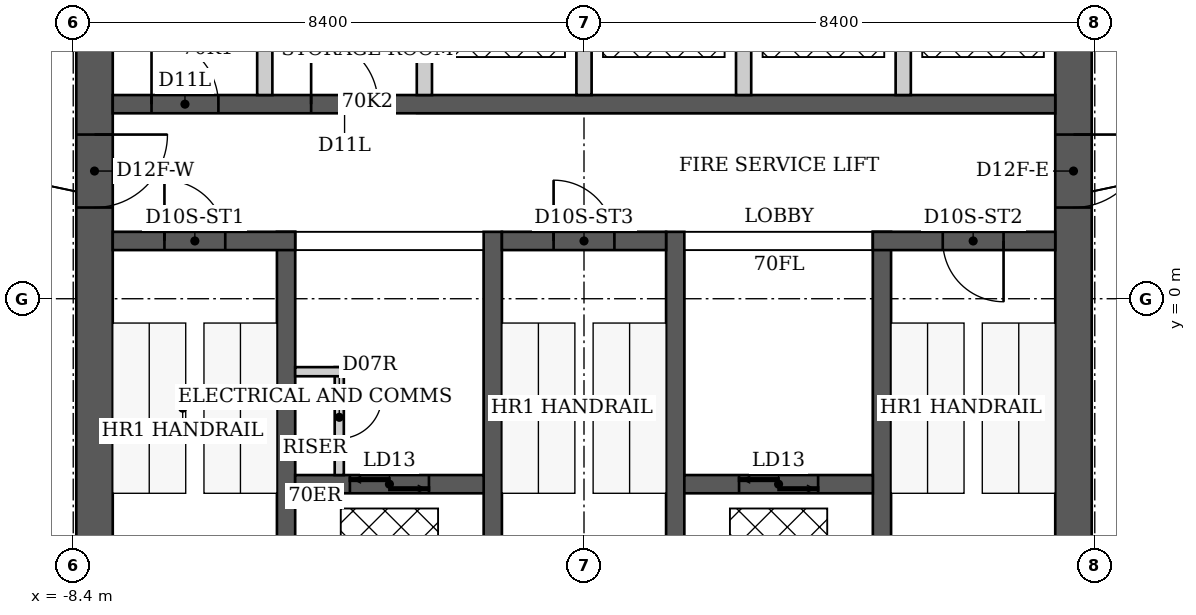
"""IFC4 building model, lengths in metres.
Left out: names, types, materials, properties, quantities, classifications, styles, units other than length and angle.
Written with IfcOpenShell. Run it as: python <this file> out.ifc"""

import sys

from ifc_helpers import new_model, si_unit, direction, frame, frame_2d, origin, place, context, subcontext, project, spatial, rectangle, extrude, element, fill, save


model = new_model("IFC4")
c1 = context("Model", 3, precision=1e-05, world=origin(), true_north=direction((0.0, 1.0)))
c2 = subcontext(c1, "Body", "Model", "MODEL_VIEW")
j1 = project(units=[si_unit("LENGTHUNIT", "METRE"), si_unit("PLANEANGLEUNIT", "RADIAN")], contexts=[c1])
p1 = place(None, origin())
s1 = spatial("IfcSite", under=j1, at=p1, CompositionType="ELEMENT")
p2 = place(p1, origin())
s2 = spatial("IfcBuilding", under=s1, at=p2, CompositionType="ELEMENT")
p3 = place(p2, frame((0.0, 0.0, 279.8)))
s3 = spatial("IfcBuildingStorey", under=s2, at=p3, CompositionType="ELEMENT", Elevation=279.8)
p4 = place(p3, frame((-8.05, -6.1, 0.0), z_axis=(0.0, 0.0, 1.0), x_axis=(0.0, 1.0, 0.0)))
e1 = element("IfcWall", 1, at=p4, inside=s3, PredefinedType="SHEAR", context=c2, shape_type="SweptSolid", body=[
    extrude(rectangle(XDim=12.2, YDim=0.6, at=frame_2d((6.1, 0.0))), origin(), (0.0, 0.0, 1.0), 3.8),
])
p5 = place(p4, frame((7.6, 0.0, 0.0)))
e2 = element("IfcOpeningElement", 2, at=p5, cuts=e1, PredefinedType="OPENING", context=c2, shape_type="SweptSolid", body=[
    extrude(rectangle(XDim=1.2, YDim=2.2, at=frame_2d((0.6, 1.1))), frame((0.0, 0.3, 0.0), z_axis=(0.0, -1.0, 0.0), x_axis=(1.0, 0.0, 0.0)), (0.0, 0.0, 1.0), 0.6),
])
p6 = place(p3, frame((8.05, -6.1, 0.0), z_axis=(0.0, 0.0, 1.0), x_axis=(0.0, 1.0, 0.0)))
e3 = element("IfcWall", 3, at=p6, inside=s3, PredefinedType="SHEAR", context=c2, shape_type="SweptSolid", body=[
    extrude(rectangle(XDim=12.2, YDim=0.6, at=frame_2d((6.1, 0.0))), origin(), (0.0, 0.0, 1.0), 3.8),
])
p7 = place(p6, frame((7.6, 0.0, 0.0)))
e4 = element("IfcOpeningElement", 4, at=p7, cuts=e3, PredefinedType="OPENING", context=c2, shape_type="SweptSolid", body=[
    extrude(rectangle(XDim=1.2, YDim=2.2, at=frame_2d((0.6, 1.1))), frame((0.0, 0.3, 0.0), z_axis=(0.0, -1.0, 0.0), x_axis=(1.0, 0.0, 0.0)), (0.0, 0.0, 1.0), 0.6),
])
for number, where, z_axis, x_axis in (
    (5, (-4.9, -6.1, 0.0), (0.0, 0.0, 1.0), (0.0, 1.0, 0.0)),
    (6, (-1.5, -6.1, 0.0), (0.0, 0.0, 1.0), (0.0, 1.0, 0.0)),
    (7, (1.5, -6.1, 0.0), (0.0, 0.0, 1.0), (0.0, 1.0, 0.0)),
    (8, (4.9, -6.1, 0.0), (0.0, 0.0, 1.0), (0.0, 1.0, 0.0)),
):
    element("IfcWall", number, at=place(p3, frame(where, z_axis=z_axis, x_axis=x_axis)), inside=s3, PredefinedType="SHEAR", context=c2, shape_type="SweptSolid", body=[
        extrude(rectangle(XDim=7.2, YDim=0.3, at=frame_2d((3.6, 0.0))), origin(), (0.0, 0.0, 1.0), 3.8),
    ])
p8 = place(p3, frame((-7.75, 0.95, 0.0), z_axis=(0.0, 0.0, 1.0), x_axis=(1.0, 0.0, 0.0)))
e9 = element("IfcWall", 9, at=p8, inside=s3, PredefinedType="SHEAR", context=c2, shape_type="SweptSolid", body=[
    extrude(rectangle(XDim=3.0, YDim=0.3, at=frame_2d((1.5, 0.0))), origin(), (0.0, 0.0, 1.0), 3.8),
])
p9 = place(p8, frame((0.85, 0.0, 0.0)))
e10 = element("IfcOpeningElement", 10, at=p9, cuts=e9, PredefinedType="OPENING", context=c2, shape_type="SweptSolid", body=[
    extrude(rectangle(XDim=1.0, YDim=2.2, at=frame_2d((0.5, 1.1))), frame((0.0, 0.15, 0.0), z_axis=(0.0, -1.0, 0.0), x_axis=(1.0, 0.0, 0.0)), (0.0, 0.0, 1.0), 0.3),
])
p10 = place(p3, frame((-1.35, 0.95, 0.0), z_axis=(0.0, 0.0, 1.0), x_axis=(1.0, 0.0, 0.0)))
e11 = element("IfcWall", 11, at=p10, inside=s3, PredefinedType="SHEAR", context=c2, shape_type="SweptSolid", body=[
    extrude(rectangle(XDim=2.7, YDim=0.3, at=frame_2d((1.35, 0.0))), origin(), (0.0, 0.0, 1.0), 3.8),
])
p11 = place(p10, frame((0.85, 0.0, 0.0)))
e12 = element("IfcOpeningElement", 12, at=p11, cuts=e11, PredefinedType="OPENING", context=c2, shape_type="SweptSolid", body=[
    extrude(rectangle(XDim=1.0, YDim=2.2, at=frame_2d((0.5, 1.1))), frame((0.0, 0.15, 0.0), z_axis=(0.0, -1.0, 0.0), x_axis=(1.0, 0.0, 0.0)), (0.0, 0.0, 1.0), 0.3),
])
p12 = place(p3, frame((4.75, 0.95, 0.0), z_axis=(0.0, 0.0, 1.0), x_axis=(1.0, 0.0, 0.0)))
e13 = element("IfcWall", 13, at=p12, inside=s3, PredefinedType="SHEAR", context=c2, shape_type="SweptSolid", body=[
    extrude(rectangle(XDim=3.0, YDim=0.3, at=frame_2d((1.5, 0.0))), origin(), (0.0, 0.0, 1.0), 3.8),
])
p13 = place(p12, frame((1.15, 0.0, 0.0)))
e14 = element("IfcOpeningElement", 14, at=p13, cuts=e13, PredefinedType="OPENING", context=c2, shape_type="SweptSolid", body=[
    extrude(rectangle(XDim=1.0, YDim=2.2, at=frame_2d((0.5, 1.1))), frame((0.0, 0.15, 0.0), z_axis=(0.0, -1.0, 0.0), x_axis=(1.0, 0.0, 0.0)), (0.0, 0.0, 1.0), 0.3),
])
p14 = place(p3, frame((-4.75, -3.05, 0.0), z_axis=(0.0, 0.0, 1.0), x_axis=(1.0, 0.0, 0.0)))
e15 = element("IfcWall", 15, at=p14, inside=s3, PredefinedType="SHEAR", context=c2, shape_type="SweptSolid", body=[
    extrude(rectangle(XDim=3.1, YDim=0.3, at=frame_2d((1.55, 0.0))), origin(), (0.0, 0.0, 1.0), 3.8),
])
p15 = place(p14, frame((0.9, 0.0, 0.0)))
e16 = element("IfcOpeningElement", 16, at=p15, cuts=e15, PredefinedType="OPENING", context=c2, shape_type="SweptSolid", body=[
    extrude(rectangle(XDim=1.3, YDim=2.1, at=frame_2d((0.65, 1.05))), frame((0.0, 0.15, 0.0), z_axis=(0.0, -1.0, 0.0), x_axis=(1.0, 0.0, 0.0)), (0.0, 0.0, 1.0), 0.3),
])
p16 = place(p3, frame((1.65, -3.05, 0.0), z_axis=(0.0, 0.0, 1.0), x_axis=(1.0, 0.0, 0.0)))
e17 = element("IfcWall", 17, at=p16, inside=s3, PredefinedType="SHEAR", context=c2, shape_type="SweptSolid", body=[
    extrude(rectangle(XDim=3.1, YDim=0.3, at=frame_2d((1.55, 0.0))), origin(), (0.0, 0.0, 1.0), 3.8),
])
p17 = place(p16, frame((0.9, 0.0, 0.0)))
e18 = element("IfcOpeningElement", 18, at=p17, cuts=e17, PredefinedType="OPENING", context=c2, shape_type="SweptSolid", body=[
    extrude(rectangle(XDim=1.3, YDim=2.1, at=frame_2d((0.65, 1.05))), frame((0.0, 0.15, 0.0), z_axis=(0.0, -1.0, 0.0), x_axis=(1.0, 0.0, 0.0)), (0.0, 0.0, 1.0), 0.3),
])
p18 = place(p3, frame((-7.75, 3.2, 0.0), z_axis=(0.0, 0.0, 1.0), x_axis=(1.0, 0.0, 0.0)))
e19 = element("IfcWall", 19, at=p18, inside=s3, PredefinedType="SHEAR", context=c2, shape_type="SweptSolid", body=[
    extrude(rectangle(XDim=15.5, YDim=0.3, at=frame_2d((7.75, 0.0))), origin(), (0.0, 0.0, 1.0), 3.8),
])
p19 = place(p18, frame((0.637, 0.0, 0.0)))
e20 = element("IfcOpeningElement", 20, at=p19, cuts=e19, PredefinedType="OPENING", context=c2, shape_type="SweptSolid", body=[
    extrude(rectangle(XDim=1.1, YDim=2.2, at=frame_2d((0.55, 1.1))), frame((0.0, 0.15, 0.0), z_axis=(0.0, -1.0, 0.0), x_axis=(1.0, 0.0, 0.0)), (0.0, 0.0, 1.0), 0.3),
])
p20 = place(p18, frame((3.262, 0.0, 0.0)))
e21 = element("IfcOpeningElement", 21, at=p20, cuts=e19, PredefinedType="OPENING", context=c2, shape_type="SweptSolid", body=[
    extrude(rectangle(XDim=1.1, YDim=2.2, at=frame_2d((0.55, 1.1))), frame((0.0, 0.15, 0.0), z_axis=(0.0, -1.0, 0.0), x_axis=(1.0, 0.0, 0.0)), (0.0, 0.0, 1.0), 0.3),
])
for number, where, z_axis, x_axis in (
    (22, (-5.25, 3.35, 0.0), (0.0, 0.0, 1.0), (0.0, 1.0, 0.0)),
    (23, (-2.625, 3.35, 0.0), (0.0, 0.0, 1.0), (0.0, 1.0, 0.0)),
    (24, (0.0, 3.35, 0.0), (0.0, 0.0, 1.0), (0.0, 1.0, 0.0)),
    (25, (2.625, 3.35, 0.0), (0.0, 0.0, 1.0), (0.0, 1.0, 0.0)),
    (26, (5.25, 3.35, 0.0), (0.0, 0.0, 1.0), (0.0, 1.0, 0.0)),
):
    element("IfcWall", number, at=place(p3, frame(where, z_axis=z_axis, x_axis=x_axis)), inside=s3, PredefinedType="PARTITIONING", context=c2, shape_type="SweptSolid", body=[
        extrude(rectangle(XDim=2.75, YDim=0.25, at=frame_2d((1.375, 0.0))), origin(), (0.0, 0.0, 1.0), 3.8),
    ])
p21 = place(p3, frame((-4.025, -2.9, 0.0), z_axis=(0.0, 0.0, 1.0), x_axis=(0.0, 1.0, 0.0)))
e27 = element("IfcWall", 27, at=p21, inside=s3, PredefinedType="PARTITIONING", context=c2, shape_type="SweptSolid", body=[
    extrude(rectangle(XDim=1.775, YDim=0.15, at=frame_2d((0.887, 0.0))), origin(), (0.0, 0.0, 1.0), 3.64),
])
p22 = place(p21, frame((0.6, 0.0, 0.0)))
e28 = element("IfcOpeningElement", 28, at=p22, cuts=e27, PredefinedType="OPENING", context=c2, shape_type="SweptSolid", body=[
    extrude(rectangle(XDim=0.7, YDim=2.1, at=frame_2d((0.35, 1.05))), frame((0.0, 0.075, 0.0), z_axis=(0.0, -1.0, 0.0), x_axis=(1.0, 0.0, 0.0)), (0.0, 0.0, 1.0), 0.15),
])
p23 = place(p3, frame((-4.75, -1.2, 0.0), z_axis=(0.0, 0.0, 1.0), x_axis=(1.0, 0.0, 0.0)))
e29 = element("IfcWall", 29, at=p23, inside=s3, PredefinedType="PARTITIONING", context=c2, shape_type="SweptSolid", body=[
    extrude(rectangle(XDim=0.8, YDim=0.15, at=frame_2d((0.4, 0.0))), origin(), (0.0, 0.0, 1.0), 3.64),
])
p24 = place(p9, origin())
e30 = element("IfcDoor", 30, at=p24, inside=s3, OperationType="SINGLE_SWING_LEFT", PredefinedType="DOOR", context=c2, shape_type="SweptSolid", body=[
    extrude(rectangle(XDim=1.0, YDim=2.2, at=frame_2d((0.5, 1.1))), frame((0.0, 0.025, 0.0), z_axis=(0.0, -1.0, 0.0), x_axis=(1.0, 0.0, 0.0)), (0.0, 0.0, 1.0), 0.05),
])
fill(e10, e30)
p25 = place(p11, origin())
e31 = element("IfcDoor", 31, at=p25, inside=s3, OperationType="SINGLE_SWING_LEFT", PredefinedType="DOOR", context=c2, shape_type="SweptSolid", body=[
    extrude(rectangle(XDim=1.0, YDim=2.2, at=frame_2d((0.5, 1.1))), frame((0.0, 0.025, 0.0), z_axis=(0.0, -1.0, 0.0), x_axis=(1.0, 0.0, 0.0)), (0.0, 0.0, 1.0), 0.05),
])
fill(e12, e31)
p26 = place(p13, origin())
e32 = element("IfcDoor", 32, at=p26, inside=s3, OperationType="SINGLE_SWING_RIGHT", PredefinedType="DOOR", context=c2, shape_type="SweptSolid", body=[
    extrude(rectangle(XDim=1.0, YDim=2.2, at=frame_2d((0.5, 1.1))), frame((0.0, 0.025, 0.0), z_axis=(0.0, -1.0, 0.0), x_axis=(1.0, 0.0, 0.0)), (0.0, 0.0, 1.0), 0.05),
])
fill(e14, e32)
p27 = place(p5, origin())
e33 = element("IfcDoor", 33, at=p27, inside=s3, OperationType="SINGLE_SWING_RIGHT", PredefinedType="DOOR", context=c2, shape_type="SweptSolid", body=[
    extrude(rectangle(XDim=1.2, YDim=2.2, at=frame_2d((0.6, 1.1))), frame((0.0, 0.025, 0.0), z_axis=(0.0, -1.0, 0.0), x_axis=(1.0, 0.0, 0.0)), (0.0, 0.0, 1.0), 0.05),
])
fill(e2, e33)
p28 = place(p7, origin())
e34 = element("IfcDoor", 34, at=p28, inside=s3, OperationType="SINGLE_SWING_RIGHT", PredefinedType="DOOR", context=c2, shape_type="SweptSolid", body=[
    extrude(rectangle(XDim=1.2, YDim=2.2, at=frame_2d((0.6, 1.1))), frame((0.0, 0.025, 0.0), z_axis=(0.0, -1.0, 0.0), x_axis=(1.0, 0.0, 0.0)), (0.0, 0.0, 1.0), 0.05),
])
fill(e4, e34)
p29 = place(p22, origin())
e35 = element("IfcDoor", 35, at=p29, inside=s3, OperationType="SINGLE_SWING_RIGHT", PredefinedType="DOOR", context=c2, shape_type="SweptSolid", body=[
    extrude(rectangle(XDim=0.7, YDim=2.1, at=frame_2d((0.35, 1.05))), frame((0.0, 0.025, 0.0), z_axis=(0.0, -1.0, 0.0), x_axis=(1.0, 0.0, 0.0)), (0.0, 0.0, 1.0), 0.05),
])
fill(e28, e35)
p30 = place(p19, origin())
e36 = element("IfcDoor", 36, at=p30, inside=s3, OperationType="SINGLE_SWING_LEFT", PredefinedType="DOOR", context=c2, shape_type="SweptSolid", body=[
    extrude(rectangle(XDim=1.1, YDim=2.2, at=frame_2d((0.55, 1.1))), frame((0.0, 0.025, 0.0), z_axis=(0.0, -1.0, 0.0), x_axis=(1.0, 0.0, 0.0)), (0.0, 0.0, 1.0), 0.05),
])
fill(e20, e36)
p31 = place(p20, origin())
e37 = element("IfcDoor", 37, at=p31, inside=s3, OperationType="SINGLE_SWING_LEFT", PredefinedType="DOOR", context=c2, shape_type="SweptSolid", body=[
    extrude(rectangle(XDim=1.1, YDim=2.2, at=frame_2d((0.55, 1.1))), frame((0.0, 0.025, 0.0), z_axis=(0.0, -1.0, 0.0), x_axis=(1.0, 0.0, 0.0)), (0.0, 0.0, 1.0), 0.05),
])
fill(e21, e37)
p32 = place(p15, origin())
e38 = element("IfcDoor", 38, at=p32, inside=s3, OperationType="DOUBLE_DOOR_SLIDING", PredefinedType="DOOR", context=c2, shape_type="SweptSolid", body=[
    extrude(rectangle(XDim=1.3, YDim=2.1, at=frame_2d((0.65, 1.05))), frame((0.0, 0.025, 0.0), z_axis=(0.0, -1.0, 0.0), x_axis=(1.0, 0.0, 0.0)), (0.0, 0.0, 1.0), 0.05),
])
fill(e16, e38)
p33 = place(p17, origin())
e39 = element("IfcDoor", 39, at=p33, inside=s3, OperationType="DOUBLE_DOOR_SLIDING", PredefinedType="DOOR", context=c2, shape_type="SweptSolid", body=[
    extrude(rectangle(XDim=1.3, YDim=2.1, at=frame_2d((0.65, 1.05))), frame((0.0, 0.025, 0.0), z_axis=(0.0, -1.0, 0.0), x_axis=(1.0, 0.0, 0.0)), (0.0, 0.0, 1.0), 0.05),
])
fill(e18, e39)
save(model, sys.argv[1])
